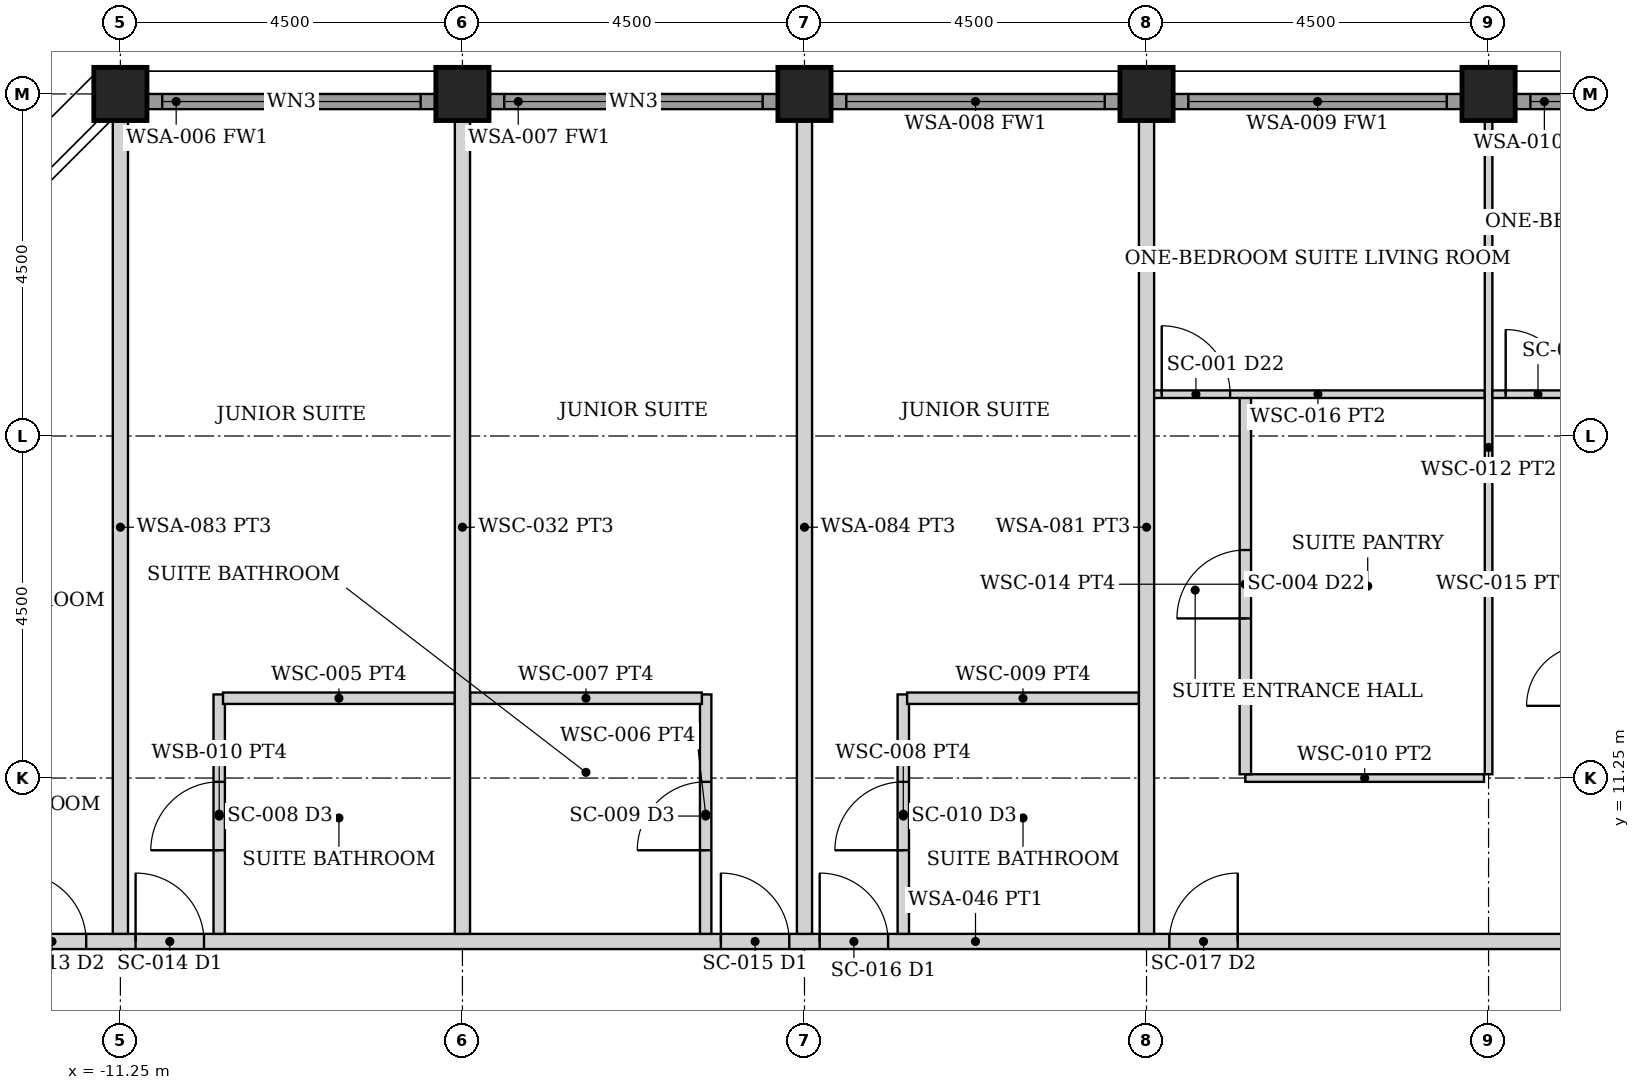
"""IFC4 building model, lengths in metres.
Left out: names, types, materials, properties, quantities, classifications, styles, units other than length and angle.
Written with IfcOpenShell. Run it as: python <this file> out.ifc"""

import sys

from ifc_helpers import new_model, si_unit, direction, frame, frame_2d, origin, origin_2d, place, context, subcontext, project, spatial, rectangle, hollow_rectangle, extrude, element, fill, save


model = new_model("IFC4")
c1 = context("Model", 3, precision=1e-05, world=origin(), true_north=direction((0.0, 1.0)))
c2 = subcontext(c1, "Body", "Model", "MODEL_VIEW")
j1 = project(units=[si_unit("LENGTHUNIT", "METRE"), si_unit("PLANEANGLEUNIT", "RADIAN")], contexts=[c1])
p1 = place(None, origin())
s1 = spatial("IfcSite", under=j1, at=p1, CompositionType="ELEMENT")
p2 = place(p1, origin())
s2 = spatial("IfcBuilding", under=s1, at=p2, CompositionType="ELEMENT")
p3 = place(p2, frame((0.0, 0.0, 223.3)))
s3 = spatial("IfcBuildingStorey", under=s2, at=p3, CompositionType="ELEMENT", Elevation=223.3)
for number, where, z_axis, x_axis in (
    (1, (-11.25, 20.25, 0.0), (0.0, 0.0, 1.0), (0.0, 1.0, 0.0)),
    (2, (-6.75, 20.25, 0.0), (0.0, 0.0, 1.0), (0.0, 1.0, 0.0)),
    (3, (-2.25, 20.25, 0.0), (0.0, 0.0, 1.0), (0.0, 1.0, 0.0)),
    (4, (2.25, 20.25, 0.0), (0.0, 0.0, 1.0), (0.0, 1.0, 0.0)),
    (5, (6.75, 20.25, 0.0), (0.0, 0.0, 1.0), (0.0, 1.0, 0.0)),
):
    element("IfcColumn", number, at=place(p3, frame(where, z_axis=z_axis, x_axis=x_axis)), inside=s3, PredefinedType="COLUMN", context=c2, shape_type="SweptSolid", body=[
        extrude(hollow_rectangle(XDim=0.7, YDim=0.7, WallThickness=0.04, at=origin_2d()), origin(), (0.0, 0.0, 1.0), 3.75),
    ])
p4 = place(p3, frame((-10.895, 20.15, 0.0), z_axis=(0.0, 0.0, 1.0), x_axis=(1.0, 0.0, 0.0)))
e6 = element("IfcWall", 6, at=p4, inside=s3, PredefinedType="SOLIDWALL", context=c2, shape_type="SweptSolid", body=[
    extrude(rectangle(XDim=3.79, YDim=0.2, at=frame_2d((1.895, 0.0))), origin(), (0.0, 0.0, 1.0), 2.629),
])
p5 = place(p4, frame((0.195, 0.0, 0.3)))
e7 = element("IfcOpeningElement", 7, at=p5, cuts=e6, PredefinedType="OPENING", context=c2, shape_type="SweptSolid", body=[
    extrude(rectangle(XDim=3.4, YDim=2.179, at=frame_2d((1.7, 1.089))), frame((0.0, 0.11, 0.0), z_axis=(0.0, -1.0, 0.0), x_axis=(1.0, 0.0, 0.0)), (0.0, 0.0, 1.0), 0.22),
])
p6 = place(p3, frame((-6.395, 20.15, 0.0), z_axis=(0.0, 0.0, 1.0), x_axis=(1.0, 0.0, 0.0)))
e8 = element("IfcWall", 8, at=p6, inside=s3, PredefinedType="SOLIDWALL", context=c2, shape_type="SweptSolid", body=[
    extrude(rectangle(XDim=3.79, YDim=0.2, at=frame_2d((1.895, 0.0))), origin(), (0.0, 0.0, 1.0), 2.629),
])
p7 = place(p6, frame((0.195, 0.0, 0.3)))
e9 = element("IfcOpeningElement", 9, at=p7, cuts=e8, PredefinedType="OPENING", context=c2, shape_type="SweptSolid", body=[
    extrude(rectangle(XDim=3.4, YDim=2.179, at=frame_2d((1.7, 1.089))), frame((0.0, 0.11, 0.0), z_axis=(0.0, -1.0, 0.0), x_axis=(1.0, 0.0, 0.0)), (0.0, 0.0, 1.0), 0.22),
])
p8 = place(p3, frame((-1.895, 20.15, 0.0), z_axis=(0.0, 0.0, 1.0), x_axis=(1.0, 0.0, 0.0)))
e10 = element("IfcWall", 10, at=p8, inside=s3, PredefinedType="SOLIDWALL", context=c2, shape_type="SweptSolid", body=[
    extrude(rectangle(XDim=3.79, YDim=0.2, at=frame_2d((1.895, 0.0))), origin(), (0.0, 0.0, 1.0), 2.629),
])
p9 = place(p8, frame((0.195, 0.0, 0.3)))
e11 = element("IfcOpeningElement", 11, at=p9, cuts=e10, PredefinedType="OPENING", context=c2, shape_type="SweptSolid", body=[
    extrude(rectangle(XDim=3.4, YDim=2.179, at=frame_2d((1.7, 1.089))), frame((0.0, 0.11, 0.0), z_axis=(0.0, -1.0, 0.0), x_axis=(1.0, 0.0, 0.0)), (0.0, 0.0, 1.0), 0.22),
])
p10 = place(p3, frame((2.605, 20.15, 0.0), z_axis=(0.0, 0.0, 1.0), x_axis=(1.0, 0.0, 0.0)))
e12 = element("IfcWall", 12, at=p10, inside=s3, PredefinedType="SOLIDWALL", context=c2, shape_type="SweptSolid", body=[
    extrude(rectangle(XDim=3.79, YDim=0.2, at=frame_2d((1.895, 0.0))), origin(), (0.0, 0.0, 1.0), 2.629),
])
p11 = place(p10, frame((0.195, 0.0, 0.3)))
e13 = element("IfcOpeningElement", 13, at=p11, cuts=e12, PredefinedType="OPENING", context=c2, shape_type="SweptSolid", body=[
    extrude(rectangle(XDim=3.4, YDim=2.179, at=frame_2d((1.7, 1.089))), frame((0.0, 0.11, 0.0), z_axis=(0.0, -1.0, 0.0), x_axis=(1.0, 0.0, 0.0)), (0.0, 0.0, 1.0), 0.22),
])
p12 = place(p3, frame((7.105, 20.15, 0.0), z_axis=(0.0, 0.0, 1.0), x_axis=(1.0, 0.0, 0.0)))
e14 = element("IfcWall", 14, at=p12, inside=s3, PredefinedType="SOLIDWALL", context=c2, shape_type="SweptSolid", body=[
    extrude(rectangle(XDim=3.79, YDim=0.2, at=frame_2d((1.895, 0.0))), origin(), (0.0, 0.0, 1.0), 2.629),
])
p13 = place(p12, frame((0.195, 0.0, 0.3)))
e15 = element("IfcOpeningElement", 15, at=p13, cuts=e14, PredefinedType="OPENING", context=c2, shape_type="SweptSolid", body=[
    extrude(rectangle(XDim=3.4, YDim=2.179, at=frame_2d((1.7, 1.089))), frame((0.0, 0.11, 0.0), z_axis=(0.0, -1.0, 0.0), x_axis=(1.0, 0.0, 0.0)), (0.0, 0.0, 1.0), 0.22),
])
p14 = place(p3, frame((-20.05, 9.1, 0.0), z_axis=(0.0, 0.0, 1.0), x_axis=(1.0, 0.0, 0.0)))
e16 = element("IfcWall", 16, at=p14, inside=s3, PredefinedType="PARTITIONING", context=c2, shape_type="SweptSolid", body=[
    extrude(rectangle(XDim=40.1, YDim=0.2, at=frame_2d((20.05, 0.0))), origin(), (0.0, 0.0, 1.0), 2.629),
])
p15 = place(p14, frame((9.0, 0.0, 0.0)))
e17 = element("IfcOpeningElement", 17, at=p15, cuts=e16, PredefinedType="OPENING", context=c2, shape_type="SweptSolid", body=[
    extrude(rectangle(XDim=0.9, YDim=2.1, at=frame_2d((0.45, 1.05))), frame((0.0, 0.11, 0.0), z_axis=(0.0, -1.0, 0.0), x_axis=(1.0, 0.0, 0.0)), (0.0, 0.0, 1.0), 0.22),
])
p16 = place(p14, frame((16.7, 0.0, 0.0)))
e18 = element("IfcOpeningElement", 18, at=p16, cuts=e16, PredefinedType="OPENING", context=c2, shape_type="SweptSolid", body=[
    extrude(rectangle(XDim=0.9, YDim=2.1, at=frame_2d((0.45, 1.05))), frame((0.0, 0.11, 0.0), z_axis=(0.0, -1.0, 0.0), x_axis=(1.0, 0.0, 0.0)), (0.0, 0.0, 1.0), 0.22),
])
p17 = place(p14, frame((18.0, 0.0, 0.0)))
e19 = element("IfcOpeningElement", 19, at=p17, cuts=e16, PredefinedType="OPENING", context=c2, shape_type="SweptSolid", body=[
    extrude(rectangle(XDim=0.9, YDim=2.1, at=frame_2d((0.45, 1.05))), frame((0.0, 0.11, 0.0), z_axis=(0.0, -1.0, 0.0), x_axis=(1.0, 0.0, 0.0)), (0.0, 0.0, 1.0), 0.22),
])
p18 = place(p14, frame((22.6, 0.0, 0.0)))
e20 = element("IfcOpeningElement", 20, at=p18, cuts=e16, PredefinedType="OPENING", context=c2, shape_type="SweptSolid", body=[
    extrude(rectangle(XDim=0.9, YDim=2.1, at=frame_2d((0.45, 1.05))), frame((0.0, 0.11, 0.0), z_axis=(0.0, -1.0, 0.0), x_axis=(1.0, 0.0, 0.0)), (0.0, 0.0, 1.0), 0.22),
])
p19 = place(p14, frame((31.75, 0.0, 0.0)))
e21 = element("IfcOpeningElement", 21, at=p19, cuts=e16, PredefinedType="OPENING", context=c2, shape_type="SweptSolid", body=[
    extrude(rectangle(XDim=0.9, YDim=2.1, at=frame_2d((0.45, 1.05))), frame((0.0, 0.11, 0.0), z_axis=(0.0, -1.0, 0.0), x_axis=(1.0, 0.0, 0.0)), (0.0, 0.0, 1.0), 0.22),
])
p20 = place(p14, frame((7.45, 0.0, 0.0)))
e22 = element("IfcOpeningElement", 22, at=p20, cuts=e16, PredefinedType="OPENING", context=c2, shape_type="SweptSolid", body=[
    extrude(rectangle(XDim=0.9, YDim=2.1, at=frame_2d((0.45, 1.05))), frame((0.0, 0.11, 0.0), z_axis=(0.0, -1.0, 0.0), x_axis=(1.0, 0.0, 0.0)), (0.0, 0.0, 1.0), 0.22),
])
p21 = place(p3, frame((-9.95, 9.2, 0.0), z_axis=(0.0, 0.0, 1.0), x_axis=(0.0, 1.0, 0.0)))
e23 = element("IfcWall", 23, at=p21, inside=s3, PredefinedType="PARTITIONING", context=c2, shape_type="SweptSolid", body=[
    extrude(rectangle(XDim=3.15, YDim=0.15, at=frame_2d((1.575, 0.0))), origin(), (0.0, 0.0, 1.0), 2.629),
])
p22 = place(p21, frame((1.1, 0.0, 0.0)))
e24 = element("IfcOpeningElement", 24, at=p22, cuts=e23, PredefinedType="OPENING", context=c2, shape_type="SweptSolid", body=[
    extrude(rectangle(XDim=0.9, YDim=2.1, at=frame_2d((0.45, 1.05))), frame((0.0, 0.085, 0.0), z_axis=(0.0, -1.0, 0.0), x_axis=(1.0, 0.0, 0.0)), (0.0, 0.0, 1.0), 0.17),
])
p23 = place(p3, frame((-9.9, 12.3, 0.0), z_axis=(0.0, 0.0, 1.0), x_axis=(1.0, 0.0, 0.0)))
e25 = element("IfcWall", 25, at=p23, inside=s3, PredefinedType="PARTITIONING", context=c2, shape_type="SweptSolid", body=[
    extrude(rectangle(XDim=3.05, YDim=0.15, at=frame_2d((1.525, 0.0))), origin(), (0.0, 0.0, 1.0), 2.629),
])
p24 = place(p3, frame((-3.55, 9.2, 0.0), z_axis=(0.0, 0.0, 1.0), x_axis=(0.0, 1.0, 0.0)))
e26 = element("IfcWall", 26, at=p24, inside=s3, PredefinedType="PARTITIONING", context=c2, shape_type="SweptSolid", body=[
    extrude(rectangle(XDim=3.15, YDim=0.15, at=frame_2d((1.575, 0.0))), origin(), (0.0, 0.0, 1.0), 2.629),
])
p25 = place(p24, frame((1.1, 0.0, 0.0)))
e27 = element("IfcOpeningElement", 27, at=p25, cuts=e26, PredefinedType="OPENING", context=c2, shape_type="SweptSolid", body=[
    extrude(rectangle(XDim=0.9, YDim=2.1, at=frame_2d((0.45, 1.05))), frame((0.0, 0.085, 0.0), z_axis=(0.0, -1.0, 0.0), x_axis=(1.0, 0.0, 0.0)), (0.0, 0.0, 1.0), 0.17),
])
p26 = place(p3, frame((-6.65, 12.3, 0.0), z_axis=(0.0, 0.0, 1.0), x_axis=(1.0, 0.0, 0.0)))
e28 = element("IfcWall", 28, at=p26, inside=s3, PredefinedType="PARTITIONING", context=c2, shape_type="SweptSolid", body=[
    extrude(rectangle(XDim=3.05, YDim=0.15, at=frame_2d((1.525, 0.0))), origin(), (0.0, 0.0, 1.0), 2.629),
])
p27 = place(p3, frame((-0.95, 9.2, 0.0), z_axis=(0.0, 0.0, 1.0), x_axis=(0.0, 1.0, 0.0)))
e29 = element("IfcWall", 29, at=p27, inside=s3, PredefinedType="PARTITIONING", context=c2, shape_type="SweptSolid", body=[
    extrude(rectangle(XDim=3.15, YDim=0.15, at=frame_2d((1.575, 0.0))), origin(), (0.0, 0.0, 1.0), 2.629),
])
p28 = place(p27, frame((1.1, 0.0, 0.0)))
e30 = element("IfcOpeningElement", 30, at=p28, cuts=e29, PredefinedType="OPENING", context=c2, shape_type="SweptSolid", body=[
    extrude(rectangle(XDim=0.9, YDim=2.1, at=frame_2d((0.45, 1.05))), frame((0.0, 0.085, 0.0), z_axis=(0.0, -1.0, 0.0), x_axis=(1.0, 0.0, 0.0)), (0.0, 0.0, 1.0), 0.17),
])
p29 = place(p3, frame((-0.9, 12.3, 0.0), z_axis=(0.0, 0.0, 1.0), x_axis=(1.0, 0.0, 0.0)))
e31 = element("IfcWall", 31, at=p29, inside=s3, PredefinedType="PARTITIONING", context=c2, shape_type="SweptSolid", body=[
    extrude(rectangle(XDim=3.05, YDim=0.15, at=frame_2d((1.525, 0.0))), origin(), (0.0, 0.0, 1.0), 2.629),
])
p30 = place(p3, frame((3.55, 11.25, 0.0), z_axis=(0.0, 0.0, 1.0), x_axis=(1.0, 0.0, 0.0)))
e32 = element("IfcWall", 32, at=p30, inside=s3, PredefinedType="PARTITIONING", context=c2, shape_type="SweptSolid", body=[
    extrude(rectangle(XDim=3.14, YDim=0.1, at=frame_2d((1.57, 0.0))), origin(), (0.0, 0.0, 1.0), 2.629),
])
p31 = place(p3, frame((3.55, 11.3, 0.0), z_axis=(0.0, 0.0, 1.0), x_axis=(0.0, 1.0, 0.0)))
e33 = element("IfcWall", 33, at=p31, inside=s3, PredefinedType="PARTITIONING", context=c2, shape_type="SweptSolid", body=[
    extrude(rectangle(XDim=5.0, YDim=0.15, at=frame_2d((2.5, 0.0))), origin(), (0.0, 0.0, 1.0), 2.629),
])
p32 = place(p31, frame((2.05, 0.0, 0.0)))
e34 = element("IfcOpeningElement", 34, at=p32, cuts=e33, PredefinedType="OPENING", context=c2, shape_type="SweptSolid", body=[
    extrude(rectangle(XDim=0.9, YDim=2.1, at=frame_2d((0.45, 1.05))), frame((0.0, 0.085, 0.0), z_axis=(0.0, -1.0, 0.0), x_axis=(1.0, 0.0, 0.0)), (0.0, 0.0, 1.0), 0.17),
])
p33 = place(p3, frame((2.31, 16.3, 0.0), z_axis=(0.0, 0.0, 1.0), x_axis=(1.0, 0.0, 0.0)))
e35 = element("IfcWall", 35, at=p33, inside=s3, PredefinedType="PARTITIONING", context=c2, shape_type="SweptSolid", body=[
    extrude(rectangle(XDim=4.39, YDim=0.1, at=frame_2d((2.195, 0.0))), origin(), (0.0, 0.0, 1.0), 2.629),
])
p34 = place(p33, frame((0.14, 0.0, 0.0)))
e36 = element("IfcOpeningElement", 36, at=p34, cuts=e35, PredefinedType="OPENING", context=c2, shape_type="SweptSolid", body=[
    extrude(rectangle(XDim=0.9, YDim=2.1, at=frame_2d((0.45, 1.05))), frame((0.0, 0.06, 0.0), z_axis=(0.0, -1.0, 0.0), x_axis=(1.0, 0.0, 0.0)), (0.0, 0.0, 1.0), 0.12),
])
p35 = place(p3, frame((6.75, 11.3, 0.0), z_axis=(0.0, 0.0, 1.0), x_axis=(0.0, 1.0, 0.0)))
e37 = element("IfcWall", 37, at=p35, inside=s3, PredefinedType="PARTITIONING", context=c2, shape_type="SweptSolid", body=[
    extrude(rectangle(XDim=8.6, YDim=0.1, at=frame_2d((4.3, 0.0))), origin(), (0.0, 0.0, 1.0), 2.629),
])
p36 = place(p3, frame((6.8, 16.3, 0.0), z_axis=(0.0, 0.0, 1.0), x_axis=(1.0, 0.0, 0.0)))
e38 = element("IfcWall", 38, at=p36, inside=s3, PredefinedType="PARTITIONING", context=c2, shape_type="SweptSolid", body=[
    extrude(rectangle(XDim=4.39, YDim=0.1, at=frame_2d((2.195, 0.0))), origin(), (0.0, 0.0, 1.0), 2.629),
])
p37 = place(p36, frame((0.175, 0.0, 0.0)))
e39 = element("IfcOpeningElement", 39, at=p37, cuts=e38, PredefinedType="OPENING", context=c2, shape_type="SweptSolid", body=[
    extrude(rectangle(XDim=0.85, YDim=2.1, at=frame_2d((0.425, 1.05))), frame((0.0, 0.06, 0.0), z_axis=(0.0, -1.0, 0.0), x_axis=(1.0, 0.0, 0.0)), (0.0, 0.0, 1.0), 0.12),
])
p38 = place(p36, frame((2.41, 0.0, 0.0)))
e40 = element("IfcOpeningElement", 40, at=p38, cuts=e38, PredefinedType="OPENING", context=c2, shape_type="SweptSolid", body=[
    extrude(rectangle(XDim=0.9, YDim=2.1, at=frame_2d((0.45, 1.05))), frame((0.0, 0.06, 0.0), z_axis=(0.0, -1.0, 0.0), x_axis=(1.0, 0.0, 0.0)), (0.0, 0.0, 1.0), 0.12),
])
for number, where, z_axis, x_axis in (
    (41, (-11.25, 9.2, 0.0), (0.0, 0.0, 1.0), (0.0, 1.0, 0.0)),
    (42, (-6.75, 9.2, 0.0), (0.0, 0.0, 1.0), (0.0, 1.0, 0.0)),
    (43, (-2.25, 9.2, 0.0), (0.0, 0.0, 1.0), (0.0, 1.0, 0.0)),
    (44, (2.25, 9.2, 0.0), (0.0, 0.0, 1.0), (0.0, 1.0, 0.0)),
):
    element("IfcWall", number, at=place(p3, frame(where, z_axis=z_axis, x_axis=x_axis)), inside=s3, PredefinedType="PARTITIONING", context=c2, shape_type="SweptSolid", body=[
        extrude(rectangle(XDim=10.7, YDim=0.2, at=frame_2d((5.35, 0.0))), origin(), (0.0, 0.0, 1.0), 2.629),
    ])
p39 = place(p5, origin())
e45 = element("IfcWindow", 45, at=p39, inside=s3, PartitioningType="SINGLE_PANEL", PredefinedType="WINDOW", context=c2, shape_type="SweptSolid", body=[
    extrude(rectangle(XDim=3.4, YDim=2.179, at=frame_2d((1.7, 1.089))), frame((0.0, 0.03, 0.0), z_axis=(0.0, -1.0, 0.0), x_axis=(1.0, 0.0, 0.0)), (0.0, 0.0, 1.0), 0.06),
])
fill(e7, e45)
p40 = place(p7, origin())
e46 = element("IfcWindow", 46, at=p40, inside=s3, PartitioningType="SINGLE_PANEL", PredefinedType="WINDOW", context=c2, shape_type="SweptSolid", body=[
    extrude(rectangle(XDim=3.4, YDim=2.179, at=frame_2d((1.7, 1.089))), frame((0.0, 0.03, 0.0), z_axis=(0.0, -1.0, 0.0), x_axis=(1.0, 0.0, 0.0)), (0.0, 0.0, 1.0), 0.06),
])
fill(e9, e46)
p41 = place(p9, origin())
e47 = element("IfcWindow", 47, at=p41, inside=s3, PartitioningType="SINGLE_PANEL", PredefinedType="WINDOW", context=c2, shape_type="SweptSolid", body=[
    extrude(rectangle(XDim=3.4, YDim=2.179, at=frame_2d((1.7, 1.089))), frame((0.0, 0.03, 0.0), z_axis=(0.0, -1.0, 0.0), x_axis=(1.0, 0.0, 0.0)), (0.0, 0.0, 1.0), 0.06),
])
fill(e11, e47)
p42 = place(p11, origin())
e48 = element("IfcWindow", 48, at=p42, inside=s3, PartitioningType="SINGLE_PANEL", PredefinedType="WINDOW", context=c2, shape_type="SweptSolid", body=[
    extrude(rectangle(XDim=3.4, YDim=2.179, at=frame_2d((1.7, 1.089))), frame((0.0, 0.03, 0.0), z_axis=(0.0, -1.0, 0.0), x_axis=(1.0, 0.0, 0.0)), (0.0, 0.0, 1.0), 0.06),
])
fill(e13, e48)
p43 = place(p13, origin())
e49 = element("IfcWindow", 49, at=p43, inside=s3, PartitioningType="SINGLE_PANEL", PredefinedType="WINDOW", context=c2, shape_type="SweptSolid", body=[
    extrude(rectangle(XDim=3.4, YDim=2.179, at=frame_2d((1.7, 1.089))), frame((0.0, 0.03, 0.0), z_axis=(0.0, -1.0, 0.0), x_axis=(1.0, 0.0, 0.0)), (0.0, 0.0, 1.0), 0.06),
])
fill(e15, e49)
p44 = place(p15, origin())
e50 = element("IfcDoor", 50, at=p44, inside=s3, OperationType="SINGLE_SWING_LEFT", PredefinedType="DOOR", context=c2, shape_type="SweptSolid", body=[
    extrude(rectangle(XDim=0.9, YDim=2.1, at=frame_2d((0.45, 1.05))), frame((0.0, 0.025, 0.0), z_axis=(0.0, -1.0, 0.0), x_axis=(1.0, 0.0, 0.0)), (0.0, 0.0, 1.0), 0.05),
])
fill(e17, e50)
p45 = place(p22, origin())
e51 = element("IfcDoor", 51, at=p45, inside=s3, OperationType="SINGLE_SWING_LEFT", PredefinedType="DOOR", context=c2, shape_type="SweptSolid", body=[
    extrude(rectangle(XDim=0.9, YDim=2.1, at=frame_2d((0.45, 1.05))), frame((0.0, 0.025, 0.0), z_axis=(0.0, -1.0, 0.0), x_axis=(1.0, 0.0, 0.0)), (0.0, 0.0, 1.0), 0.05),
])
fill(e24, e51)
p46 = place(p16, origin())
e52 = element("IfcDoor", 52, at=p46, inside=s3, OperationType="SINGLE_SWING_LEFT", PredefinedType="DOOR", context=c2, shape_type="SweptSolid", body=[
    extrude(rectangle(XDim=0.9, YDim=2.1, at=frame_2d((0.45, 1.05))), frame((0.0, 0.025, 0.0), z_axis=(0.0, -1.0, 0.0), x_axis=(1.0, 0.0, 0.0)), (0.0, 0.0, 1.0), 0.05),
])
fill(e18, e52)
p47 = place(p25, origin())
e53 = element("IfcDoor", 53, at=p47, inside=s3, OperationType="SINGLE_SWING_LEFT", PredefinedType="DOOR", context=c2, shape_type="SweptSolid", body=[
    extrude(rectangle(XDim=0.9, YDim=2.1, at=frame_2d((0.45, 1.05))), frame((0.0, 0.025, 0.0), z_axis=(0.0, -1.0, 0.0), x_axis=(1.0, 0.0, 0.0)), (0.0, 0.0, 1.0), 0.05),
])
fill(e27, e53)
p48 = place(p17, origin())
e54 = element("IfcDoor", 54, at=p48, inside=s3, OperationType="SINGLE_SWING_LEFT", PredefinedType="DOOR", context=c2, shape_type="SweptSolid", body=[
    extrude(rectangle(XDim=0.9, YDim=2.1, at=frame_2d((0.45, 1.05))), frame((0.0, 0.025, 0.0), z_axis=(0.0, -1.0, 0.0), x_axis=(1.0, 0.0, 0.0)), (0.0, 0.0, 1.0), 0.05),
])
fill(e19, e54)
p49 = place(p28, origin())
e55 = element("IfcDoor", 55, at=p49, inside=s3, OperationType="SINGLE_SWING_LEFT", PredefinedType="DOOR", context=c2, shape_type="SweptSolid", body=[
    extrude(rectangle(XDim=0.9, YDim=2.1, at=frame_2d((0.45, 1.05))), frame((0.0, 0.025, 0.0), z_axis=(0.0, -1.0, 0.0), x_axis=(1.0, 0.0, 0.0)), (0.0, 0.0, 1.0), 0.05),
])
fill(e30, e55)
p50 = place(p18, origin())
e56 = element("IfcDoor", 56, at=p50, inside=s3, OperationType="SINGLE_SWING_RIGHT", PredefinedType="DOOR", context=c2, shape_type="SweptSolid", body=[
    extrude(rectangle(XDim=0.9, YDim=2.1, at=frame_2d((0.45, 1.05))), frame((0.0, 0.025, 0.0), z_axis=(0.0, -1.0, 0.0), x_axis=(1.0, 0.0, 0.0)), (0.0, 0.0, 1.0), 0.05),
])
fill(e20, e56)
p51 = place(p32, origin())
e57 = element("IfcDoor", 57, at=p51, inside=s3, OperationType="SINGLE_SWING_LEFT", PredefinedType="DOOR", context=c2, shape_type="SweptSolid", body=[
    extrude(rectangle(XDim=0.9, YDim=2.1, at=frame_2d((0.45, 1.05))), frame((0.0, 0.025, 0.0), z_axis=(0.0, -1.0, 0.0), x_axis=(1.0, 0.0, 0.0)), (0.0, 0.0, 1.0), 0.05),
])
fill(e34, e57)
p52 = place(p34, origin())
e58 = element("IfcDoor", 58, at=p52, inside=s3, OperationType="SINGLE_SWING_LEFT", PredefinedType="DOOR", context=c2, shape_type="SweptSolid", body=[
    extrude(rectangle(XDim=0.9, YDim=2.1, at=frame_2d((0.45, 1.05))), frame((0.0, 0.025, 0.0), z_axis=(0.0, -1.0, 0.0), x_axis=(1.0, 0.0, 0.0)), (0.0, 0.0, 1.0), 0.05),
])
fill(e36, e58)
p53 = place(p37, origin())
e59 = element("IfcDoor", 59, at=p53, inside=s3, OperationType="SINGLE_SWING_LEFT", PredefinedType="DOOR", context=c2, shape_type="SweptSolid", body=[
    extrude(rectangle(XDim=0.85, YDim=2.1, at=frame_2d((0.425, 1.05))), frame((0.0, 0.025, 0.0), z_axis=(0.0, -1.0, 0.0), x_axis=(1.0, 0.0, 0.0)), (0.0, 0.0, 1.0), 0.05),
])
fill(e39, e59)
p54 = place(p20, origin())
e60 = element("IfcDoor", 60, at=p54, inside=s3, OperationType="SINGLE_SWING_LEFT", PredefinedType="DOOR", context=c2, shape_type="SweptSolid", body=[
    extrude(rectangle(XDim=0.9, YDim=2.1, at=frame_2d((0.45, 1.05))), frame((0.0, 0.025, 0.0), z_axis=(0.0, -1.0, 0.0), x_axis=(1.0, 0.0, 0.0)), (0.0, 0.0, 1.0), 0.05),
])
fill(e22, e60)
save(model, sys.argv[1])
